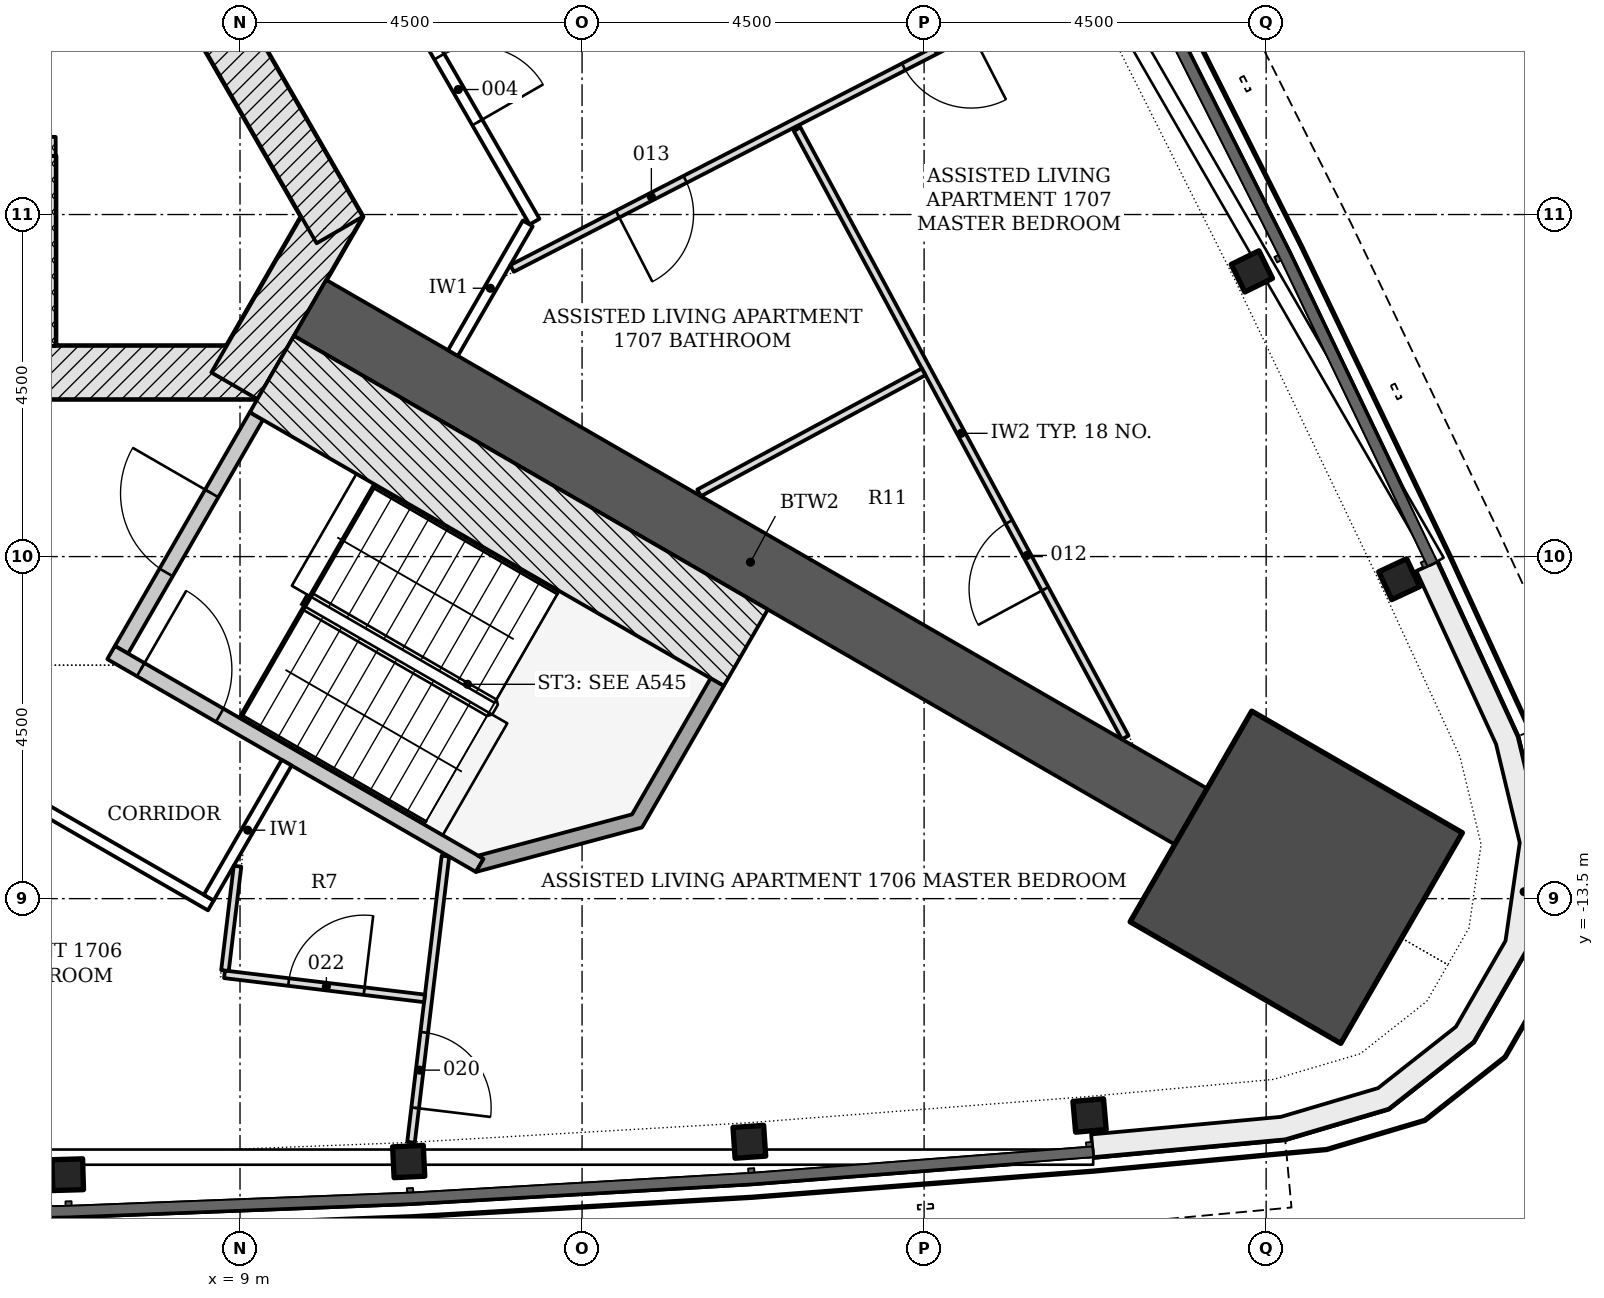
"""IFC4 building model, lengths in metres.
Left out: names, types, materials, properties, quantities, classifications, styles, units other than length and angle.
Written with IfcOpenShell. Run it as: python <this file> out.ifc"""

import sys

from ifc_helpers import new_model, si_unit, direction, frame, frame_2d, origin, origin_2d, place, context, subcontext, project, spatial, polyline, rectangle, i_section, outline, extrude, element, fill, save


model = new_model("IFC4")
c1 = context("Model", 3, precision=1e-05, world=origin(), true_north=direction((0.0, 1.0)))
c2 = subcontext(c1, "Body", "Model", "MODEL_VIEW")
j1 = project(units=[si_unit("LENGTHUNIT", "METRE"), si_unit("PLANEANGLEUNIT", "RADIAN")], contexts=[c1])
p1 = place(None, origin())
s1 = spatial("IfcSite", under=j1, at=p1, CompositionType="ELEMENT")
p2 = place(p1, origin())
s2 = spatial("IfcBuilding", under=s1, at=p2, CompositionType="ELEMENT")
p3 = place(p2, frame((0.0, 0.0, 69.0)))
s3 = spatial("IfcBuildingStorey", under=s2, at=p3, CompositionType="ELEMENT", Elevation=69.0)
p4 = place(p3, frame((-9.229, -6.578, -0.2), z_axis=(0.0, 0.0, 1.0), x_axis=(1.0, 0.0, 0.0)))
e1 = element("IfcWall", 1, at=p4, inside=s3, PredefinedType="SHEAR", context=c2, shape_type="SweptSolid", body=[
    extrude(rectangle(XDim=18.458, YDim=0.7, at=frame_2d((9.229, 0.0))), origin(), (0.0, 0.0, 1.0), 3.6),
])
p5 = place(p4, frame((3.304, 0.0, 0.2)))
e2 = element("IfcOpeningElement", 2, at=p5, cuts=e1, PredefinedType="OPENING", context=c2, shape_type="SweptSolid", body=[
    extrude(rectangle(XDim=1.1, YDim=2.1, at=frame_2d((0.55, 1.05))), frame((0.0, 0.36, 0.0), z_axis=(0.0, -1.0, 0.0), x_axis=(1.0, 0.0, 0.0)), (0.0, 0.0, 1.0), 0.72),
])
p6 = place(p4, frame((5.454, 0.0, 0.2)))
e3 = element("IfcOpeningElement", 3, at=p6, cuts=e1, PredefinedType="OPENING", context=c2, shape_type="SweptSolid", body=[
    extrude(rectangle(XDim=1.1, YDim=2.1, at=frame_2d((0.55, 1.05))), frame((0.0, 0.36, 0.0), z_axis=(0.0, -1.0, 0.0), x_axis=(1.0, 0.0, 0.0)), (0.0, 0.0, 1.0), 0.72),
])
p7 = place(p4, frame((7.604, 0.0, 0.2)))
e4 = element("IfcOpeningElement", 4, at=p7, cuts=e1, PredefinedType="OPENING", context=c2, shape_type="SweptSolid", body=[
    extrude(rectangle(XDim=1.1, YDim=2.1, at=frame_2d((0.55, 1.05))), frame((0.0, 0.36, 0.0), z_axis=(0.0, -1.0, 0.0), x_axis=(1.0, 0.0, 0.0)), (0.0, 0.0, 1.0), 0.72),
])
p8 = place(p4, frame((9.754, 0.0, 0.2)))
e5 = element("IfcOpeningElement", 5, at=p8, cuts=e1, PredefinedType="OPENING", context=c2, shape_type="SweptSolid", body=[
    extrude(rectangle(XDim=1.1, YDim=2.1, at=frame_2d((0.55, 1.05))), frame((0.0, 0.36, 0.0), z_axis=(0.0, -1.0, 0.0), x_axis=(1.0, 0.0, 0.0)), (0.0, 0.0, 1.0), 0.72),
])
p9 = place(p4, frame((11.904, 0.0, 0.2)))
e6 = element("IfcOpeningElement", 6, at=p9, cuts=e1, PredefinedType="OPENING", context=c2, shape_type="SweptSolid", body=[
    extrude(rectangle(XDim=1.1, YDim=2.1, at=frame_2d((0.55, 1.05))), frame((0.0, 0.36, 0.0), z_axis=(0.0, -1.0, 0.0), x_axis=(1.0, 0.0, 0.0)), (0.0, 0.0, 1.0), 0.72),
])
p10 = place(p4, frame((14.054, 0.0, 0.2)))
e7 = element("IfcOpeningElement", 7, at=p10, cuts=e1, PredefinedType="OPENING", context=c2, shape_type="SweptSolid", body=[
    extrude(rectangle(XDim=1.1, YDim=2.1, at=frame_2d((0.55, 1.05))), frame((0.0, 0.36, 0.0), z_axis=(0.0, -1.0, 0.0), x_axis=(1.0, 0.0, 0.0)), (0.0, 0.0, 1.0), 0.72),
])
p11 = place(p4, frame((1.029, 0.0, 0.2)))
e8 = element("IfcOpeningElement", 8, at=p11, cuts=e1, PredefinedType="OPENING", context=c2, shape_type="SweptSolid", body=[
    extrude(rectangle(XDim=1.0, YDim=2.1, at=frame_2d((0.5, 1.05))), frame((0.0, 0.36, 0.0), z_axis=(0.0, -1.0, 0.0), x_axis=(1.0, 0.0, 0.0)), (0.0, 0.0, 1.0), 0.72),
])
p12 = place(p3, frame((8.926, -6.753, -0.2), z_axis=(0.0, 0.0, 1.0), x_axis=(0.500042739161, 0.866000726912, 0.0)))
e9 = element("IfcWall", 9, at=p12, inside=s3, PredefinedType="SHEAR", context=c2, shape_type="SweptSolid", body=[
    extrude(rectangle(XDim=2.771, YDim=0.7, at=frame_2d((1.386, 0.0))), origin(), (0.0, 0.0, 1.0), 3.6),
])
p13 = place(p3, frame((10.311, -4.703, -0.2), z_axis=(0.0, 0.0, 1.0), x_axis=(-0.500001446645, 0.866024568562, 0.0)))
e10 = element("IfcWall", 10, at=p13, inside=s3, PredefinedType="SHEAR", context=c2, shape_type="SweptSolid", body=[
    extrude(rectangle(XDim=18.458, YDim=0.7, at=frame_2d((9.229, 0.0))), origin(), (0.0, 0.0, 1.0), 3.6),
])
p14 = place(p13, frame((9.5, 0.0, 0.2)))
e11 = element("IfcOpeningElement", 11, at=p14, cuts=e10, PredefinedType="OPENING", context=c2, shape_type="SweptSolid", body=[
    extrude(rectangle(XDim=1.0, YDim=2.1, at=frame_2d((0.5, 1.05))), frame((0.0, 0.36, 0.0), z_axis=(0.0, -1.0, 0.0), x_axis=(1.0, 0.0, 0.0)), (0.0, 0.0, 1.0), 0.72),
])
p15 = place(p13, frame((4.402, 0.0, 0.2)))
e12 = element("IfcOpeningElement", 12, at=p15, cuts=e10, PredefinedType="OPENING", context=c2, shape_type="SweptSolid", body=[
    extrude(rectangle(XDim=0.9, YDim=2.1, at=frame_2d((0.45, 1.05))), frame((0.0, 0.36, 0.0), z_axis=(0.0, -1.0, 0.0), x_axis=(1.0, 0.0, 0.0)), (0.0, 0.0, 1.0), 0.72),
])
p16 = place(p13, frame((13.927, 0.0, 0.2)))
e13 = element("IfcOpeningElement", 13, at=p16, cuts=e10, PredefinedType="OPENING", context=c2, shape_type="SweptSolid", body=[
    extrude(rectangle(XDim=0.9, YDim=2.1, at=frame_2d((0.45, 1.05))), frame((0.0, 0.36, 0.0), z_axis=(0.0, -1.0, 0.0), x_axis=(1.0, 0.0, 0.0)), (0.0, 0.0, 1.0), 0.72),
])
p17 = place(p3, frame((9.922, -5.728, -0.2), z_axis=(0.0, 0.0, 1.0), x_axis=(0.866026077102, -0.499998833779, 0.0)))
e14 = element("IfcWall", 14, at=p17, inside=s3, PredefinedType="SHEAR", context=c2, shape_type="SweptSolid", body=[
    extrude(rectangle(XDim=13.381, YDim=0.85, at=frame_2d((6.691, 0.0))), origin(), (0.0, 0.0, 1.0), 3.6),
])
p18 = place(p3, frame((22.896, -13.219, -0.2), z_axis=(0.0, 0.0, 1.0), x_axis=(0.866025403784, -0.5, 0.0)))
e15 = element("IfcColumn", 15, at=p18, inside=s3, PredefinedType="COLUMN", context=c2, shape_type="SweptSolid", body=[
    extrude(rectangle(XDim=3.2, YDim=3.2, at=origin_2d()), origin(), (0.0, 0.0, 1.0), 3.6),
])
for number, where, z_axis, x_axis in (
    (16, (6.733, -17.132, -0.2), (0.0, 0.0, 1.0), (1.0, 0.029, 0.0)),
    (17, (11.219, -16.958, -0.2), (0.0, 0.0, 1.0), (0.999, 0.048, 0.0)),
    (18, (15.701, -16.699, -0.2), (0.0, 0.0, 1.0), (0.998, 0.067, 0.0)),
    (19, (20.177, -16.353, -0.2), (0.0, 0.0, 1.0), (0.996, 0.087, 0.0)),
    (20, (24.25, -9.297, -0.2), (0.0, 0.0, 1.0), (-0.423, 0.906, 0.0)),
    (21, (22.312, -5.248, -0.2), (0.0, 0.0, 1.0), (-0.44, 0.898, 0.0)),
):
    element("IfcColumn", number, at=place(p3, frame(where, z_axis=z_axis, x_axis=x_axis)), inside=s3, PredefinedType="COLUMN", context=c2, shape_type="SweptSolid", body=[
        extrude(i_section(OverallWidth=0.404, OverallDepth=0.406, WebThickness=0.027, FlangeThickness=0.044, FilletRadius=0.015, at=origin_2d()), origin(), (0.0, 0.0, 1.0), 3.6),
    ])
p19 = place(p3, origin())
e22 = element("IfcWall", 22, at=p19, inside=s3, PredefinedType="NOTDEFINED", context=c2, shape_type="SweptSolid", body=[
    extrude(outline(polyline([(20.225, -16.901), (22.75, -16.667), (24.112, -16.264), (25.228, -15.385), (25.938, -14.155), (26.141, -12.75), (25.809, -11.369), (24.749, -9.065), (24.476, -9.19), (25.524, -11.468), (25.836, -12.764), (25.649, -14.055), (24.997, -15.185), (23.972, -15.993), (22.693, -16.371), (20.197, -16.602), (20.225, -16.901)])), origin(), (0.0, 0.0, 1.0), 3.3),
])
p20 = place(p3, frame((6.45, -6.228, -0.2), z_axis=(0.0, 0.0, 1.0), x_axis=(0.0, 1.0, 0.0)))
e23 = element("IfcWall", 23, at=p20, inside=s3, PredefinedType="PARTITIONING", context=c2, shape_type="SweptSolid", body=[
    extrude(rectangle(XDim=2.5, YDim=0.25, at=frame_2d((1.25, 0.0))), origin(), (0.0, 0.0, 1.0), 3.6),
])
p21 = place(p3, frame((-6.575, -3.603, 0.0), z_axis=(0.0, 0.0, 1.0), x_axis=(1.0, 0.0, 0.0)))
e24 = element("IfcWall", 24, at=p21, inside=s3, PredefinedType="PARTITIONING", context=c2, shape_type="SweptSolid", body=[
    extrude(rectangle(XDim=13.15, YDim=0.25, at=frame_2d((6.575, 0.0))), origin(), (0.0, 0.0, 1.0), 3.4),
])
p22 = place(p3, frame((7.44, -10.226, -0.2), z_axis=(0.0, 0.0, 1.0), x_axis=(0.500022077904, 0.866012656725, 0.0)))
e25 = element("IfcWall", 25, at=p22, inside=s3, PredefinedType="SHEAR", context=c2, shape_type="SweptSolid", body=[
    extrude(rectangle(XDim=3.55, YDim=0.2, at=frame_2d((1.775, 0.0))), origin(), (0.0, 0.0, 1.0), 3.6),
])
p23 = place(p22, frame((1.175, 0.0, 0.2)))
e26 = element("IfcOpeningElement", 26, at=p23, cuts=e25, PredefinedType="OPENING", context=c2, shape_type="SweptSolid", body=[
    extrude(rectangle(XDim=1.2, YDim=2.1, at=frame_2d((0.6, 1.05))), frame((0.0, 0.11, 0.0), z_axis=(0.0, -1.0, 0.0), x_axis=(1.0, 0.0, 0.0)), (0.0, 0.0, 1.0), 0.22),
])
p24 = place(p3, frame((7.304, -10.262, -0.2), z_axis=(0.0, 0.0, 1.0), x_axis=(0.866026594901, -0.49999793692, 0.0)))
e27 = element("IfcWall", 27, at=p24, inside=s3, PredefinedType="SHEAR", context=c2, shape_type="SweptSolid", body=[
    extrude(rectangle(XDim=5.6, YDim=0.2, at=frame_2d((2.8, 0.0))), origin(), (0.0, 0.0, 1.0), 3.6),
])
p25 = place(p24, frame((0.45, 0.0, 0.2)))
e28 = element("IfcOpeningElement", 28, at=p25, cuts=e27, PredefinedType="OPENING", context=c2, shape_type="SweptSolid", body=[
    extrude(rectangle(XDim=1.2, YDim=2.1, at=frame_2d((0.6, 1.05))), frame((0.0, 0.11, 0.0), z_axis=(0.0, -1.0, 0.0), x_axis=(1.0, 0.0, 0.0)), (0.0, 0.0, 1.0), 0.22),
])
p26 = place(p3, frame((9.419, -6.599, -0.2), z_axis=(0.0, 0.0, 1.0), x_axis=(0.866033125095, -0.499986626058, 0.0)))
e29 = element("IfcWall", 29, at=p26, inside=s3, PredefinedType="SHEAR", context=c2, shape_type="SweptSolid", body=[
    extrude(rectangle(XDim=7.2, YDim=1.161, at=frame_2d((3.6, 0.0))), origin(), (0.0, 0.0, 1.0), 3.6),
])
p27 = place(p3, frame((0.0, 0.0, -0.2)))
e30 = element("IfcWall", 30, at=p27, inside=s3, PredefinedType="SHEAR", context=c2, shape_type="SweptSolid", body=[
    extrude(outline(polyline([(12.104, -13.149), (14.289, -12.563), (15.364, -10.701), (15.191, -10.601), (14.157, -12.392), (12.132, -12.934), (12.204, -12.976), (12.204, -12.976), (12.204, -12.976), (12.204, -12.976), (12.204, -12.976), (12.204, -12.976), (12.204, -12.976), (12.204, -12.976), (12.204, -12.976), (12.204, -12.976), (12.204, -12.976), (12.204, -12.976), (12.204, -12.976), (12.204, -12.976), (12.204, -12.976), (12.204, -12.976), (12.204, -12.976), (12.104, -13.149)])), origin(), (0.0, 0.0, 1.0), 3.6),
])
p28 = place(p3, frame((5.346, 8.446, 0.0), z_axis=(0.0, 0.0, 1.0), x_axis=(0.500008781656, -0.866020333634, 0.0)))
e31 = element("IfcWall", 31, at=p28, inside=s3, PredefinedType="PARTITIONING", context=c2, shape_type="SweptSolid", body=[
    extrude(rectangle(XDim=15.057, YDim=0.15, at=frame_2d((7.528, 0.0))), origin(), (0.0, 0.0, 1.0), 2.778),
])
p29 = place(p28, frame((12.55, 0.0, 0.0)))
e32 = element("IfcOpeningElement", 32, at=p29, cuts=e31, PredefinedType="OPENING", context=c2, shape_type="SweptSolid", body=[
    extrude(rectangle(XDim=1.0, YDim=2.1, at=frame_2d((0.5, 1.05))), frame((0.0, 0.085, 0.0), z_axis=(0.0, -1.0, 0.0), x_axis=(1.0, 0.0, 0.0)), (0.0, 0.0, 1.0), 0.17),
])
p30 = place(p28, frame((6.753, 0.0, 0.0)))
e33 = element("IfcOpeningElement", 33, at=p30, cuts=e31, PredefinedType="OPENING", context=c2, shape_type="SweptSolid", body=[
    extrude(rectangle(XDim=1.0, YDim=2.1, at=frame_2d((0.5, 1.05))), frame((0.0, 0.085, 0.0), z_axis=(0.0, -1.0, 0.0), x_axis=(1.0, 0.0, 0.0)), (0.0, 0.0, 1.0), 0.17),
])
p31 = place(p3, frame((8.616, -13.589, 0.0), z_axis=(0.0, 0.0, 1.0), x_axis=(-0.866039313704, 0.499975906538, 0.0)))
e34 = element("IfcWall", 34, at=p31, inside=s3, PredefinedType="PARTITIONING", context=c2, shape_type="SweptSolid", body=[
    extrude(rectangle(XDim=5.892, YDim=0.15, at=frame_2d((2.946, 0.0))), origin(), (0.0, 0.0, 1.0), 2.778),
])
p32 = place(p31, frame((2.475, 0.0, 0.0)))
e35 = element("IfcOpeningElement", 35, at=p32, cuts=e34, PredefinedType="OPENING", context=c2, shape_type="SweptSolid", body=[
    extrude(rectangle(XDim=1.0, YDim=2.1, at=frame_2d((0.5, 1.05))), frame((0.0, 0.085, 0.0), z_axis=(0.0, -1.0, 0.0), x_axis=(1.0, 0.0, 0.0)), (0.0, 0.0, 1.0), 0.17),
])
p33 = place(p3, frame((8.589, -13.487, 0.0), z_axis=(0.0, 0.0, 1.0), x_axis=(0.499956128963, 0.866050731258, 0.0)))
e36 = element("IfcWall", 36, at=p33, inside=s3, PredefinedType="PARTITIONING", context=c2, shape_type="SweptSolid", body=[
    extrude(rectangle(XDim=2.05, YDim=0.15, at=frame_2d((1.025, 0.0))), origin(), (0.0, 0.0, 1.0), 3.4),
])
p34 = place(p3, frame((11.801, -6.323, 0.0), z_axis=(0.0, 0.0, 1.0), x_axis=(0.500058665202, 0.865991530765, 0.0)))
e37 = element("IfcWall", 37, at=p34, inside=s3, PredefinedType="PARTITIONING", context=c2, shape_type="SweptSolid", body=[
    extrude(rectangle(XDim=1.969, YDim=0.15, at=frame_2d((0.985, 0.0))), origin(), (0.0, 0.0, 1.0), 2.778),
])
p35 = place(p3, frame((20.646, -11.38, 0.0), z_axis=(0.0, 0.0, 1.0), x_axis=(-0.474727306664, 0.880132935588, 0.0)))
e38 = element("IfcWall", 38, at=p35, inside=s3, PredefinedType="PARTITIONING", context=c2, shape_type="SweptSolid", body=[
    extrude(rectangle(XDim=9.094, YDim=0.1, at=frame_2d((4.547, 0.0))), origin(), (0.0, 0.0, 1.0), 2.778),
])
p36 = place(p35, frame((2.222, 0.0, 0.0)))
e39 = element("IfcOpeningElement", 39, at=p36, cuts=e38, PredefinedType="OPENING", context=c2, shape_type="SweptSolid", body=[
    extrude(rectangle(XDim=1.0, YDim=2.1, at=frame_2d((0.5, 1.05))), frame((0.0, 0.06, 0.0), z_axis=(0.0, -1.0, 0.0), x_axis=(1.0, 0.0, 0.0)), (0.0, 0.0, 1.0), 0.12),
])
p37 = place(p3, frame((20.074, -1.351, 0.0), z_axis=(0.0, 0.0, 1.0), x_axis=(-0.88912315758, -0.457668013582, 0.0)))
e40 = element("IfcWall", 40, at=p37, inside=s3, PredefinedType="PARTITIONING", context=c2, shape_type="SweptSolid", body=[
    extrude(rectangle(XDim=8.429, YDim=0.1, at=frame_2d((4.214, 0.0))), origin(), (0.0, 0.0, 1.0), 2.778),
])
p38 = place(p37, frame((5.868, 0.0, 0.0)))
e41 = element("IfcOpeningElement", 41, at=p38, cuts=e40, PredefinedType="OPENING", context=c2, shape_type="SweptSolid", body=[
    extrude(rectangle(XDim=1.0, YDim=2.1, at=frame_2d((0.5, 1.05))), frame((0.0, 0.06, 0.0), z_axis=(0.0, -1.0, 0.0), x_axis=(1.0, 0.0, 0.0)), (0.0, 0.0, 1.0), 0.12),
])
p39 = place(p37, frame((1.635, 0.0, 0.0)))
e42 = element("IfcOpeningElement", 42, at=p39, cuts=e40, PredefinedType="OPENING", context=c2, shape_type="SweptSolid", body=[
    extrude(rectangle(XDim=1.0, YDim=2.1, at=frame_2d((0.5, 1.05))), frame((0.0, 0.06, 0.0), z_axis=(0.0, -1.0, 0.0), x_axis=(1.0, 0.0, 0.0)), (0.0, 0.0, 1.0), 0.12),
])
p40 = place(p3, frame((11.703, -12.94, 0.0), z_axis=(0.0, 0.0, 1.0), x_axis=(-0.119454840068, -0.99283963518, 0.0)))
e43 = element("IfcWall", 43, at=p40, inside=s3, PredefinedType="PARTITIONING", context=c2, shape_type="SweptSolid", body=[
    extrude(rectangle(XDim=3.793, YDim=0.1, at=frame_2d((1.896, 0.0))), origin(), (0.0, 0.0, 1.0), 2.923),
])
p41 = place(p40, frame((2.336, 0.0, 0.0)))
e44 = element("IfcOpeningElement", 44, at=p41, cuts=e43, PredefinedType="OPENING", context=c2, shape_type="SweptSolid", body=[
    extrude(rectangle(XDim=1.0, YDim=2.1, at=frame_2d((0.5, 1.05))), frame((0.0, 0.06, 0.0), z_axis=(0.0, -1.0, 0.0), x_axis=(1.0, 0.0, 0.0)), (0.0, 0.0, 1.0), 0.12),
])
p42 = place(p3, frame((17.994, -6.569, 0.0), z_axis=(0.0, 0.0, 1.0), x_axis=(-0.880148573472, -0.474698313263, 0.0)))
e45 = element("IfcWall", 45, at=p42, inside=s3, PredefinedType="PARTITIONING", context=c2, shape_type="SweptSolid", body=[
    extrude(rectangle(XDim=3.356, YDim=0.1, at=frame_2d((1.678, 0.0))), origin(), (0.0, 0.0, 1.0), 3.4),
])
p43 = place(p3, frame((8.796, -14.496, 0.0), z_axis=(0.0, 0.0, 1.0), x_axis=(0.992835802838, -0.119486687973, 0.0)))
e46 = element("IfcWall", 46, at=p43, inside=s3, PredefinedType="PARTITIONING", context=c2, shape_type="SweptSolid", body=[
    extrude(rectangle(XDim=2.65, YDim=0.1, at=frame_2d((1.325, 0.0))), origin(), (0.0, 0.0, 1.0), 2.923),
])
p44 = place(p43, frame((0.85, 0.0, 0.0)))
e47 = element("IfcOpeningElement", 47, at=p44, cuts=e46, PredefinedType="OPENING", context=c2, shape_type="SweptSolid", body=[
    extrude(rectangle(XDim=1.0, YDim=2.1, at=frame_2d((0.5, 1.05))), frame((0.0, 0.06, 0.0), z_axis=(0.0, -1.0, 0.0), x_axis=(1.0, 0.0, 0.0)), (0.0, 0.0, 1.0), 0.12),
])
p45 = place(p3, frame((8.967, -13.073, 0.0), z_axis=(0.0, 0.0, 1.0), x_axis=(-0.119493210152, -0.992835017879, 0.0)))
e48 = element("IfcWall", 48, at=p45, inside=s3, PredefinedType="PARTITIONING", context=c2, shape_type="SweptSolid", body=[
    extrude(rectangle(XDim=1.383, YDim=0.1, at=frame_2d((0.692, 0.0))), origin(), (0.0, 0.0, 1.0), 3.4),
])
p46 = place(p23, origin())
e49 = element("IfcDoor", 49, at=p46, inside=s3, OperationType="SINGLE_SWING_RIGHT", PredefinedType="DOOR", context=c2, shape_type="SweptSolid", body=[
    extrude(rectangle(XDim=1.2, YDim=2.1, at=frame_2d((0.6, 1.05))), frame((0.0, 0.025, 0.0), z_axis=(0.0, -1.0, 0.0), x_axis=(1.0, 0.0, 0.0)), (0.0, 0.0, 1.0), 0.05),
])
fill(e26, e49)
p47 = place(p25, origin())
e50 = element("IfcDoor", 50, at=p47, inside=s3, OperationType="SINGLE_SWING_LEFT", PredefinedType="DOOR", context=c2, shape_type="SweptSolid", body=[
    extrude(rectangle(XDim=1.2, YDim=2.1, at=frame_2d((0.6, 1.05))), frame((0.0, 0.025, 0.0), z_axis=(0.0, -1.0, 0.0), x_axis=(1.0, 0.0, 0.0)), (0.0, 0.0, 1.0), 0.05),
])
fill(e28, e50)
p48 = place(p29, origin())
e51 = element("IfcDoor", 51, at=p48, inside=s3, OperationType="SINGLE_SWING_RIGHT", PredefinedType="DOOR", context=c2, shape_type="SweptSolid", body=[
    extrude(rectangle(XDim=1.0, YDim=2.1, at=frame_2d((0.5, 1.05))), frame((0.0, 0.025, 0.0), z_axis=(0.0, -1.0, 0.0), x_axis=(1.0, 0.0, 0.0)), (0.0, 0.0, 1.0), 0.05),
])
fill(e32, e51)
p49 = place(p36, origin())
e52 = element("IfcDoor", 52, at=p49, inside=s3, OperationType="SINGLE_SWING_LEFT", PredefinedType="DOOR", context=c2, shape_type="SweptSolid", body=[
    extrude(rectangle(XDim=1.0, YDim=2.1, at=frame_2d((0.5, 1.05))), frame((0.0, 0.025, 0.0), z_axis=(0.0, -1.0, 0.0), x_axis=(1.0, 0.0, 0.0)), (0.0, 0.0, 1.0), 0.05),
])
fill(e39, e52)
p50 = place(p38, origin())
e53 = element("IfcDoor", 53, at=p50, inside=s3, OperationType="SINGLE_SWING_RIGHT", PredefinedType="DOOR", context=c2, shape_type="SweptSolid", body=[
    extrude(rectangle(XDim=1.0, YDim=2.1, at=frame_2d((0.5, 1.05))), frame((0.0, 0.025, 0.0), z_axis=(0.0, -1.0, 0.0), x_axis=(1.0, 0.0, 0.0)), (0.0, 0.0, 1.0), 0.05),
])
fill(e41, e53)
p51 = place(p39, origin())
e54 = element("IfcDoor", 54, at=p51, inside=s3, OperationType="SINGLE_SWING_LEFT", PredefinedType="DOOR", context=c2, shape_type="SweptSolid", body=[
    extrude(rectangle(XDim=1.0, YDim=2.1, at=frame_2d((0.5, 1.05))), frame((0.0, 0.025, 0.0), z_axis=(0.0, -1.0, 0.0), x_axis=(1.0, 0.0, 0.0)), (0.0, 0.0, 1.0), 0.05),
])
fill(e42, e54)
p52 = place(p41, origin())
e55 = element("IfcDoor", 55, at=p52, inside=s3, OperationType="SINGLE_SWING_RIGHT", PredefinedType="DOOR", context=c2, shape_type="SweptSolid", body=[
    extrude(rectangle(XDim=1.0, YDim=2.1, at=frame_2d((0.5, 1.05))), frame((0.0, 0.025, 0.0), z_axis=(0.0, -1.0, 0.0), x_axis=(1.0, 0.0, 0.0)), (0.0, 0.0, 1.0), 0.05),
])
fill(e44, e55)
p53 = place(p44, origin())
e56 = element("IfcDoor", 56, at=p53, inside=s3, OperationType="SINGLE_SWING_RIGHT", PredefinedType="DOOR", context=c2, shape_type="SweptSolid", body=[
    extrude(rectangle(XDim=1.0, YDim=2.1, at=frame_2d((0.5, 1.05))), frame((0.0, 0.025, 0.0), z_axis=(0.0, -1.0, 0.0), x_axis=(1.0, 0.0, 0.0)), (0.0, 0.0, 1.0), 0.05),
])
fill(e47, e56)
save(model, sys.argv[1])
